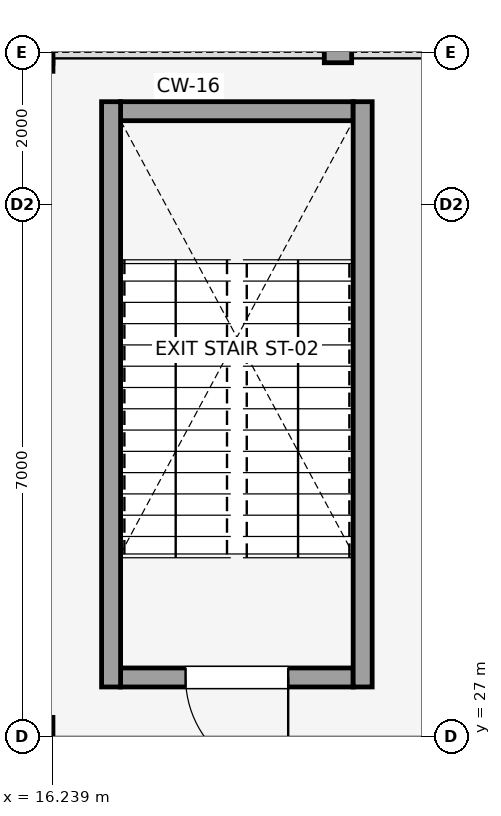
"""IFC4 building model, lengths in metres.
Left out: names, types, materials, properties, quantities, classifications, styles, units other than length and angle.
Written with IfcOpenShell. Run it as: python <this file> out.ifc"""

import sys

from ifc_helpers import new_model, si_unit, direction, frame, frame_2d, origin, origin_2d, place, context, subcontext, project, spatial, rectangle, extrude, element, fill, save


model = new_model("IFC4")
c1 = context("Model", 3, precision=1e-05, world=origin(), true_north=direction((0.0, 1.0)))
c2 = subcontext(c1, "Body", "Model", "MODEL_VIEW")
j1 = project(units=[si_unit("LENGTHUNIT", "METRE"), si_unit("PLANEANGLEUNIT", "RADIAN")], contexts=[c1])
p1 = place(None, origin())
s1 = spatial("IfcSite", under=j1, at=p1, CompositionType="ELEMENT")
p2 = place(p1, origin())
s2 = spatial("IfcBuilding", under=s1, at=p2, CompositionType="ELEMENT")
p3 = place(p2, frame((0.0, 0.0, 4.5)))
s3 = spatial("IfcBuildingStorey", under=s2, at=p3, CompositionType="ELEMENT", Elevation=4.5)
for number, where, z_axis, x_axis in (
    (1, (16.0, 27.0, 0.0), (0.0, 0.0, 1.0), (1.0, 0.0, 0.0)),
    (2, (16.0, 36.0, 0.0), (0.0, 0.0, 1.0), (1.0, 0.0, 0.0)),
):
    element("IfcColumn", number, at=place(p3, frame(where, z_axis=z_axis, x_axis=x_axis)), inside=s3, PredefinedType="COLUMN", context=c2, shape_type="SweptSolid", body=[
        extrude(rectangle(XDim=0.5, YDim=0.5, at=origin_2d()), origin(), (0.0, 0.0, 1.0), 4.5),
    ])
p4 = place(p3, frame((16.25, 36.0, 0.0), z_axis=(0.0, 0.0, 1.0), x_axis=(-1.0, 0.0, 0.0)))
e3 = element("IfcWall", 3, at=p4, inside=s3, PredefinedType="SOLIDWALL", context=c2, shape_type="SweptSolid", body=[
    extrude(rectangle(XDim=8.5, YDim=0.29, at=frame_2d((4.25, 0.0))), origin(), (0.0, 0.0, 1.0), 3.12),
])
p5 = place(p3, frame((20.18, 36.0, 0.0), z_axis=(0.0, 0.0, 1.0), x_axis=(-1.0, 0.0, 0.0)))
e4 = element("IfcWall", 4, at=p5, inside=s3, PredefinedType="SOLIDWALL", context=c2, shape_type="SweptSolid", body=[
    extrude(rectangle(XDim=0.36, YDim=0.275, at=frame_2d((0.18, 0.0))), origin(), (0.0, 0.0, 1.0), 3.12),
])
p6 = place(p3, frame((20.2, 27.775, 0.0), z_axis=(0.0, 0.0, 1.0), x_axis=(-1.0, 0.0, 0.0)))
e5 = element("IfcWall", 5, at=p6, inside=s3, PredefinedType="SHEAR", context=c2, shape_type="SweptSolid", body=[
    extrude(rectangle(XDim=3.06, YDim=0.25, at=frame_2d((1.53, 0.0))), origin(), (0.0, 0.0, 1.0), 4.5),
])
p7 = place(p6, frame((0.855, 0.0, 0.0)))
e6 = element("IfcOpeningElement", 6, at=p7, cuts=e5, PredefinedType="OPENING", context=c2, shape_type="SweptSolid", body=[
    extrude(rectangle(XDim=1.35, YDim=2.15, at=frame_2d((0.675, 1.075))), frame((0.0, 0.135, 0.0), z_axis=(0.0, -1.0, 0.0), x_axis=(1.0, 0.0, 0.0)), (0.0, 0.0, 1.0), 0.27),
])
p8 = place(p3, frame((20.2, 35.225, 0.0), z_axis=(0.0, 0.0, 1.0), x_axis=(-1.0, 0.0, 0.0)))
e7 = element("IfcWall", 7, at=p8, inside=s3, PredefinedType="SHEAR", context=c2, shape_type="SweptSolid", body=[
    extrude(rectangle(XDim=3.06, YDim=0.25, at=frame_2d((1.53, 0.0))), origin(), (0.0, 0.0, 1.0), 4.5),
])
for number, where, z_axis, x_axis in (
    (8, (20.325, 27.65, 0.0), (0.0, 0.0, 1.0), (0.0, 1.0, 0.0)),
    (9, (17.015, 27.65, 0.0), (0.0, 0.0, 1.0), (0.0, 1.0, 0.0)),
):
    element("IfcWall", number, at=place(p3, frame(where, z_axis=z_axis, x_axis=x_axis)), inside=s3, PredefinedType="SHEAR", context=c2, shape_type="SweptSolid", body=[
        extrude(rectangle(XDim=7.7, YDim=0.25, at=frame_2d((3.85, 0.0))), origin(), (0.0, 0.0, 1.0), 4.5),
    ])
p9 = place(p7, origin())
e10 = element("IfcDoor", 10, at=p9, inside=s3, OperationType="SINGLE_SWING_LEFT", PredefinedType="DOOR", context=c2, shape_type="SweptSolid", body=[
    extrude(rectangle(XDim=1.35, YDim=2.15, at=frame_2d((0.675, 1.075))), frame((0.0, 0.025, 0.0), z_axis=(0.0, -1.0, 0.0), x_axis=(1.0, 0.0, 0.0)), (0.0, 0.0, 1.0), 0.05),
])
fill(e6, e10)
save(model, sys.argv[1])
